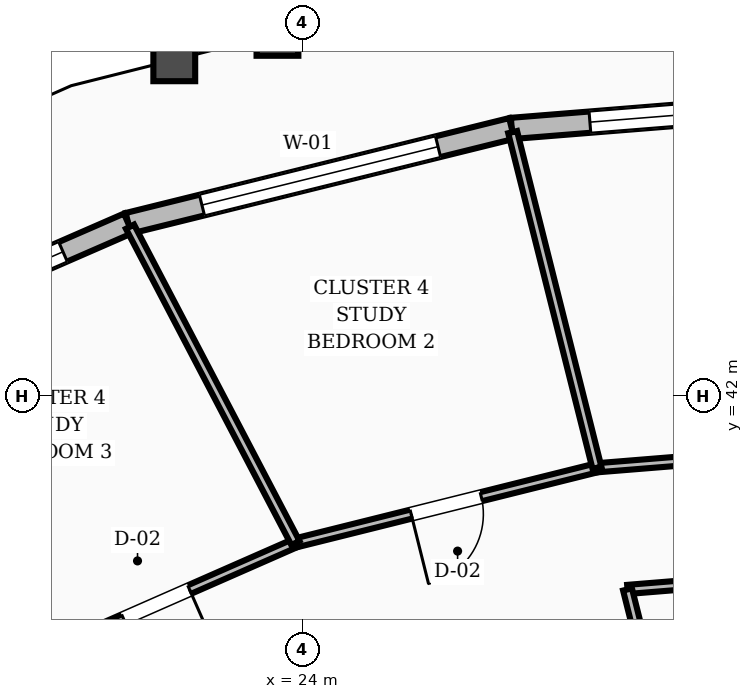
"""IFC4 building model, lengths in metres.
Left out: names, types, materials, properties, quantities, classifications, styles, units other than length and angle.
Written with IfcOpenShell. Run it as: python <this file> out.ifc"""

import sys

from ifc_helpers import new_model, si_unit, direction, frame, frame_2d, origin, place, context, subcontext, project, spatial, rectangle, extrude, element, fill, save


model = new_model("IFC4")
c1 = context("Model", 3, precision=1e-05, world=origin(), true_north=direction((0.0, 1.0)))
c2 = subcontext(c1, "Body", "Model", "MODEL_VIEW")
j1 = project(units=[si_unit("LENGTHUNIT", "METRE"), si_unit("PLANEANGLEUNIT", "RADIAN")], contexts=[c1])
p1 = place(None, origin())
s1 = spatial("IfcSite", under=j1, at=p1, CompositionType="ELEMENT")
p2 = place(p1, origin())
s2 = spatial("IfcBuilding", under=s1, at=p2, CompositionType="ELEMENT")
p3 = place(p2, frame((0.0, 0.0, 98.8)))
s3 = spatial("IfcBuildingStorey", under=s2, at=p3, CompositionType="ELEMENT", Elevation=98.8)
p4 = place(p3, frame((32.0, 45.938, 0.0), z_axis=(0.0, 0.0, 1.0), x_axis=(-0.996790751388, -0.080051220775, 0.0)))
e1 = element("IfcWall", 1, at=p4, inside=s3, PredefinedType="STANDARD", context=c2, shape_type="SweptSolid", body=[
    extrude(rectangle(XDim=5.264, YDim=0.28, at=frame_2d((2.632, 0.0))), origin(), (0.0, 0.0, 1.0), 2.71),
])
p5 = place(p4, frame((1.032, 0.0, 0.8)))
e2 = element("IfcOpeningElement", 2, at=p5, cuts=e1, PredefinedType="OPENING", context=c2, shape_type="SweptSolid", body=[
    extrude(rectangle(XDim=3.2, YDim=1.65, at=frame_2d((1.6, 0.825))), frame((0.0, 0.15, 0.0), z_axis=(0.0, -1.0, 0.0), x_axis=(1.0, 0.0, 0.0)), (0.0, 0.0, 1.0), 0.3),
])
p6 = place(p3, frame((26.753, 45.517, 0.0), z_axis=(0.0, 0.0, 1.0), x_axis=(-0.970717253555, -0.240224923043, 0.0)))
e3 = element("IfcWall", 3, at=p6, inside=s3, PredefinedType="STANDARD", context=c2, shape_type="SweptSolid", body=[
    extrude(rectangle(XDim=5.197, YDim=0.28, at=frame_2d((2.599, 0.0))), origin(), (0.0, 0.0, 1.0), 2.71),
])
p7 = place(p6, frame((0.999, 0.0, 0.8)))
e4 = element("IfcOpeningElement", 4, at=p7, cuts=e3, PredefinedType="OPENING", context=c2, shape_type="SweptSolid", body=[
    extrude(rectangle(XDim=3.2, YDim=1.65, at=frame_2d((1.6, 0.825))), frame((0.0, 0.15, 0.0), z_axis=(0.0, -1.0, 0.0), x_axis=(1.0, 0.0, 0.0)), (0.0, 0.0, 1.0), 0.3),
])
p8 = place(p3, frame((21.708, 44.269, 0.0), z_axis=(0.0, 0.0, 1.0), x_axis=(-0.9166625106, -0.399662159405, 0.0)))
e5 = element("IfcWall", 5, at=p8, inside=s3, PredefinedType="STANDARD", context=c2, shape_type="SweptSolid", body=[
    extrude(rectangle(XDim=5.073, YDim=0.28, at=frame_2d((2.536, 0.0))), origin(), (0.0, 0.0, 1.0), 2.71),
])
p9 = place(p8, frame((0.936, 0.0, 0.8)))
e6 = element("IfcOpeningElement", 6, at=p9, cuts=e5, PredefinedType="OPENING", context=c2, shape_type="SweptSolid", body=[
    extrude(rectangle(XDim=3.2, YDim=1.65, at=frame_2d((1.6, 0.825))), frame((0.0, 0.15, 0.0), z_axis=(0.0, -1.0, 0.0), x_axis=(1.0, 0.0, 0.0)), (0.0, 0.0, 1.0), 0.3),
])
p10 = place(p3, frame((32.0, 39.755, 0.0), z_axis=(0.0, 0.0, 1.0), x_axis=(-0.996711382833, -0.081033445759, 0.0)))
e7 = element("IfcWall", 7, at=p10, inside=s3, PredefinedType="PARTITIONING", context=c2, shape_type="SweptSolid", body=[
    extrude(rectangle(XDim=3.736, YDim=0.12, at=frame_2d((1.868, 0.0))), origin(), (0.0, 0.0, 1.0), 2.71),
])
p11 = place(p3, frame((28.869, 37.094, 0.0), z_axis=(0.0, 0.0, 1.0), x_axis=(-0.243645657548, 0.969864317087, 0.0)))
e8 = element("IfcWall", 8, at=p11, inside=s3, PredefinedType="PARTITIONING", context=c2, shape_type="SweptSolid", body=[
    extrude(rectangle(XDim=2.432, YDim=0.12, at=frame_2d((1.216, 0.0))), origin(), (0.0, 0.0, 1.0), 2.71),
])
p12 = place(p11, frame((0.44, 0.0, 0.0)))
e9 = element("IfcOpeningElement", 9, at=p12, cuts=e8, PredefinedType="OPENING", context=c2, shape_type="SweptSolid", body=[
    extrude(rectangle(XDim=0.86, YDim=2.1, at=frame_2d((0.43, 1.05))), frame((0.0, 0.07, 0.0), z_axis=(0.0, -1.0, 0.0), x_axis=(1.0, 0.0, 0.0)), (0.0, 0.0, 1.0), 0.14),
])
p13 = place(p3, frame((32.0, 41.387, 0.0), z_axis=(0.0, 0.0, 1.0), x_axis=(-0.996734311019, -0.080750933352, 0.0)))
e10 = element("IfcWall", 10, at=p13, inside=s3, PredefinedType="PARTITIONING", context=c2, shape_type="SweptSolid", body=[
    extrude(rectangle(XDim=4.139, YDim=0.12, at=frame_2d((2.069, 0.0))), origin(), (0.0, 0.0, 1.0), 2.71),
])
p14 = place(p13, frame((1.594, 0.0, 0.0)))
e11 = element("IfcOpeningElement", 11, at=p14, cuts=e10, PredefinedType="OPENING", context=c2, shape_type="SweptSolid", body=[
    extrude(rectangle(XDim=0.95, YDim=2.1, at=frame_2d((0.475, 1.05))), frame((0.0, 0.07, 0.0), z_axis=(0.0, -1.0, 0.0), x_axis=(1.0, 0.0, 0.0)), (0.0, 0.0, 1.0), 0.14),
])
p15 = place(p3, frame((27.875, 41.052, 0.0), z_axis=(0.0, 0.0, 1.0), x_axis=(-0.970275821055, -0.242001717092, 0.0)))
e12 = element("IfcWall", 12, at=p15, inside=s3, PredefinedType="PARTITIONING", context=c2, shape_type="SweptSolid", body=[
    extrude(rectangle(XDim=4.089, YDim=0.12, at=frame_2d((2.044, 0.0))), origin(), (0.0, 0.0, 1.0), 2.71),
])
p16 = place(p15, frame((1.569, 0.0, 0.0)))
e13 = element("IfcOpeningElement", 13, at=p16, cuts=e12, PredefinedType="OPENING", context=c2, shape_type="SweptSolid", body=[
    extrude(rectangle(XDim=0.95, YDim=2.1, at=frame_2d((0.475, 1.05))), frame((0.0, 0.07, 0.0), z_axis=(0.0, -1.0, 0.0), x_axis=(1.0, 0.0, 0.0)), (0.0, 0.0, 1.0), 0.14),
])
p17 = place(p3, frame((27.875, 41.052, 0.0), z_axis=(0.0, 0.0, 1.0), x_axis=(-0.243645699313, 0.969864306595, 0.0)))
e14 = element("IfcWall", 14, at=p17, inside=s3, PredefinedType="PARTITIONING", context=c2, shape_type="SweptSolid", body=[
    extrude(rectangle(XDim=4.553, YDim=0.12, at=frame_2d((2.277, 0.0))), origin(), (0.0, 0.0, 1.0), 2.71),
])
p18 = place(p3, frame((23.907, 40.063, 0.0), z_axis=(0.0, 0.0, 1.0), x_axis=(-0.915495231318, -0.402328822524, 0.0)))
e15 = element("IfcWall", 15, at=p18, inside=s3, PredefinedType="PARTITIONING", context=c2, shape_type="SweptSolid", body=[
    extrude(rectangle(XDim=3.993, YDim=0.12, at=frame_2d((1.997, 0.0))), origin(), (0.0, 0.0, 1.0), 2.71),
])
p19 = place(p18, frame((1.522, 0.0, 0.0)))
e16 = element("IfcOpeningElement", 16, at=p19, cuts=e15, PredefinedType="OPENING", context=c2, shape_type="SweptSolid", body=[
    extrude(rectangle(XDim=0.95, YDim=2.1, at=frame_2d((0.475, 1.05))), frame((0.0, 0.07, 0.0), z_axis=(0.0, -1.0, 0.0), x_axis=(1.0, 0.0, 0.0)), (0.0, 0.0, 1.0), 0.14),
])
p20 = place(p3, frame((23.907, 40.063, 0.0), z_axis=(0.0, 0.0, 1.0), x_axis=(-0.463443515986, 0.886126462471, 0.0)))
e17 = element("IfcWall", 17, at=p20, inside=s3, PredefinedType="PARTITIONING", context=c2, shape_type="SweptSolid", body=[
    extrude(rectangle(XDim=4.696, YDim=0.12, at=frame_2d((2.348, 0.0))), origin(), (0.0, 0.0, 1.0), 2.71),
])
p21 = place(p5, origin())
e18 = element("IfcWindow", 18, at=p21, inside=s3, PartitioningType="SINGLE_PANEL", PredefinedType="WINDOW", context=c2, shape_type="SweptSolid", body=[
    extrude(rectangle(XDim=3.2, YDim=1.65, at=frame_2d((1.6, 0.825))), frame((0.0, 0.03, 0.0), z_axis=(0.0, -1.0, 0.0), x_axis=(1.0, 0.0, 0.0)), (0.0, 0.0, 1.0), 0.06),
])
fill(e2, e18)
p22 = place(p7, origin())
e19 = element("IfcWindow", 19, at=p22, inside=s3, PartitioningType="SINGLE_PANEL", PredefinedType="WINDOW", context=c2, shape_type="SweptSolid", body=[
    extrude(rectangle(XDim=3.2, YDim=1.65, at=frame_2d((1.6, 0.825))), frame((0.0, 0.03, 0.0), z_axis=(0.0, -1.0, 0.0), x_axis=(1.0, 0.0, 0.0)), (0.0, 0.0, 1.0), 0.06),
])
fill(e4, e19)
p23 = place(p9, origin())
e20 = element("IfcWindow", 20, at=p23, inside=s3, PartitioningType="SINGLE_PANEL", PredefinedType="WINDOW", context=c2, shape_type="SweptSolid", body=[
    extrude(rectangle(XDim=3.2, YDim=1.65, at=frame_2d((1.6, 0.825))), frame((0.0, 0.03, 0.0), z_axis=(0.0, -1.0, 0.0), x_axis=(1.0, 0.0, 0.0)), (0.0, 0.0, 1.0), 0.06),
])
fill(e6, e20)
p24 = place(p16, origin())
e21 = element("IfcDoor", 21, at=p24, inside=s3, OperationType="SINGLE_SWING_RIGHT", PredefinedType="DOOR", context=c2, shape_type="SweptSolid", body=[
    extrude(rectangle(XDim=0.95, YDim=2.1, at=frame_2d((0.475, 1.05))), frame((0.0, 0.025, 0.0), z_axis=(0.0, -1.0, 0.0), x_axis=(1.0, 0.0, 0.0)), (0.0, 0.0, 1.0), 0.05),
])
fill(e13, e21)
p25 = place(p19, origin())
e22 = element("IfcDoor", 22, at=p25, inside=s3, OperationType="SINGLE_SWING_LEFT", PredefinedType="DOOR", context=c2, shape_type="SweptSolid", body=[
    extrude(rectangle(XDim=0.95, YDim=2.1, at=frame_2d((0.475, 1.05))), frame((0.0, 0.025, 0.0), z_axis=(0.0, -1.0, 0.0), x_axis=(1.0, 0.0, 0.0)), (0.0, 0.0, 1.0), 0.05),
])
fill(e16, e22)
save(model, sys.argv[1])
